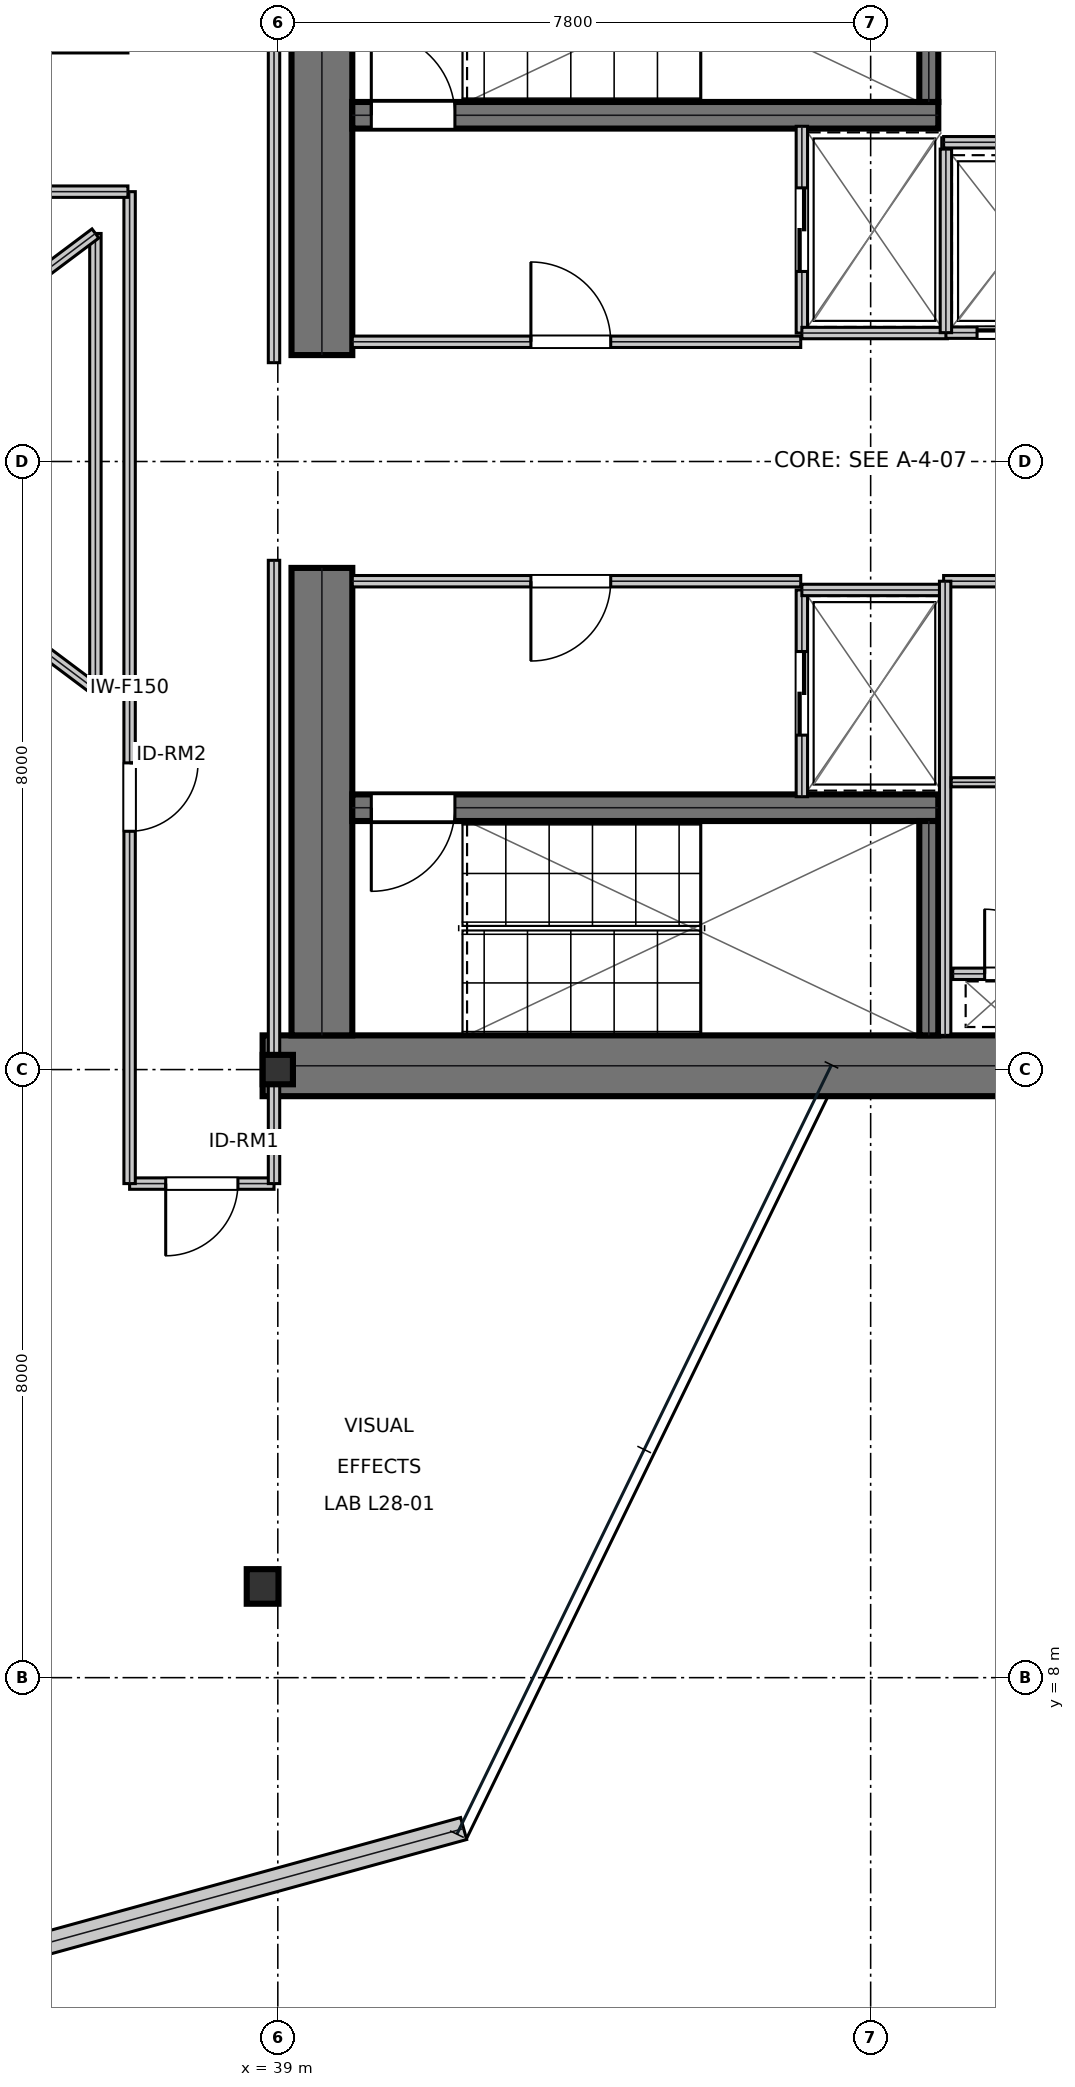
"""IFC4 building model, lengths in metres.
Left out: names, types, materials, properties, quantities, classifications, styles, units other than length and angle.
Written with IfcOpenShell. Run it as: python <this file> out.ifc"""

import sys

from ifc_helpers import new_model, si_unit, direction, frame, frame_2d, origin, origin_2d, place, context, subcontext, project, spatial, rectangle, i_section, extrude, element, fill, save


model = new_model("IFC4")
c1 = context("Model", 3, precision=1e-05, world=origin(), true_north=direction((0.0, 1.0)))
c2 = subcontext(c1, "Body", "Model", "MODEL_VIEW")
j1 = project(units=[si_unit("LENGTHUNIT", "METRE"), si_unit("PLANEANGLEUNIT", "RADIAN")], contexts=[c1])
p1 = place(None, origin())
s1 = spatial("IfcSite", under=j1, at=p1, CompositionType="ELEMENT")
p2 = place(p1, origin())
s2 = spatial("IfcBuilding", under=s1, at=p2, CompositionType="ELEMENT")
p3 = place(p2, frame((0.0, 0.0, 124.95)))
s3 = spatial("IfcBuildingStorey", under=s2, at=p3, CompositionType="ELEMENT", Elevation=124.95)
p4 = place(p3, frame((38.8, 16.05, 0.0), z_axis=(0.0, 0.0, 1.0), x_axis=(1.0, 0.0, 0.0)))
e1 = element("IfcWall", 1, at=p4, inside=s3, PredefinedType="SHEAR", context=c2, shape_type="SweptSolid", body=[
    extrude(rectangle(XDim=16.0, YDim=0.8, at=frame_2d((8.0, 0.0))), origin(), (0.0, 0.0, 1.0), 3.81),
])
for number, where, z_axis, x_axis in (
    (2, (39.58, 16.45, 0.0), (0.0, 0.0, 1.0), (0.0, 1.0, 0.0)),
    (3, (39.58, 25.4, 0.0), (0.0, 0.0, 1.0), (0.0, 1.0, 0.0)),
):
    element("IfcWall", number, at=place(p3, frame(where, z_axis=z_axis, x_axis=x_axis)), inside=s3, PredefinedType="SHEAR", context=c2, shape_type="SweptSolid", body=[
        extrude(rectangle(XDim=6.15, YDim=0.8, at=frame_2d((3.075, 0.0))), origin(), (0.0, 0.0, 1.0), 3.81),
    ])
p5 = place(p3, frame((39.98, 28.555, 0.0), z_axis=(0.0, 0.0, 1.0), x_axis=(1.0, 0.0, 0.0)))
e4 = element("IfcWall", 4, at=p5, inside=s3, PredefinedType="SHEAR", context=c2, shape_type="SweptSolid", body=[
    extrude(rectangle(XDim=7.71, YDim=0.35, at=frame_2d((3.855, 0.0))), origin(), (0.0, 0.0, 1.0), 3.81),
])
p6 = place(p5, frame((0.25, 0.0, 0.0)))
e5 = element("IfcOpeningElement", 5, at=p6, cuts=e4, PredefinedType="OPENING", context=c2, shape_type="SweptSolid", body=[
    extrude(rectangle(XDim=1.1, YDim=2.15, at=frame_2d((0.55, 1.075))), frame((0.0, 0.185, 0.0), z_axis=(0.0, -1.0, 0.0), x_axis=(1.0, 0.0, 0.0)), (0.0, 0.0, 1.0), 0.37),
])
p7 = place(p3, frame((39.98, 19.445, 0.0), z_axis=(0.0, 0.0, 1.0), x_axis=(1.0, 0.0, 0.0)))
e6 = element("IfcWall", 6, at=p7, inside=s3, PredefinedType="SHEAR", context=c2, shape_type="SweptSolid", body=[
    extrude(rectangle(XDim=7.71, YDim=0.35, at=frame_2d((3.855, 0.0))), origin(), (0.0, 0.0, 1.0), 3.81),
])
p8 = place(p7, frame((0.25, 0.0, 0.0)))
e7 = element("IfcOpeningElement", 7, at=p8, cuts=e6, PredefinedType="OPENING", context=c2, shape_type="SweptSolid", body=[
    extrude(rectangle(XDim=1.1, YDim=2.15, at=frame_2d((0.55, 1.075))), frame((0.0, 0.185, 0.0), z_axis=(0.0, -1.0, 0.0), x_axis=(1.0, 0.0, 0.0)), (0.0, 0.0, 1.0), 0.37),
])
for number, where, z_axis, x_axis in (
    (8, (47.565, 28.73, 0.0), (0.0, 0.0, 1.0), (0.0, 1.0, 0.0)),
    (9, (47.565, 16.45, 0.0), (0.0, 0.0, 1.0), (0.0, 1.0, 0.0)),
):
    element("IfcWall", number, at=place(p3, frame(where, z_axis=z_axis, x_axis=x_axis)), inside=s3, PredefinedType="SHEAR", context=c2, shape_type="SweptSolid", body=[
        extrude(rectangle(XDim=2.82, YDim=0.25, at=frame_2d((1.41, 0.0))), origin(), (0.0, 0.0, 1.0), 3.81),
    ])
p9 = place(p3, frame((39.0, 16.0, 0.0), z_axis=(0.0, 0.0, 1.0), x_axis=(1.0, 0.0, 0.0)))
e10 = element("IfcColumn", 10, at=p9, inside=s3, PredefinedType="COLUMN", context=c2, shape_type="SweptSolid", body=[
    extrude(i_section(OverallWidth=0.398, OverallDepth=0.387, WebThickness=0.021, FlangeThickness=0.033, at=origin_2d()), origin(), (0.0, 0.0, 1.0), 4.044),
])
p10 = place(p3, frame((38.8, 9.2, 0.016), z_axis=(-0.006254246892, 0.037343318823, 0.999282923368), x_axis=(-0.986263587143, -0.165179104839, 0.0)))
e11 = element("IfcColumn", 11, at=p10, inside=s3, PredefinedType="COLUMN", context=c2, shape_type="SweptSolid", body=[
    extrude(i_section(OverallWidth=0.418, OverallDepth=0.455, WebThickness=0.042, FlangeThickness=0.068, at=origin_2d()), origin(), (0.0, 0.0, 1.0), 4.021),
])
p11 = place(p3, frame((35.043, 4.255, 0.0), z_axis=(0.0, 0.0, 1.0), x_axis=(0.96422724659, 0.265077001894, 0.0)))
e12 = element("IfcWall", 12, at=p11, inside=s3, PredefinedType="STANDARD", context=c2, shape_type="SweptSolid", body=[
    extrude(rectangle(XDim=6.64, YDim=0.3, at=frame_2d((3.32, 0.0))), origin(), (0.0, 0.0, 1.0), 3.81),
])
p12 = place(p3, frame((39.98, 25.575, 0.0), z_axis=(0.0, 0.0, 1.0), x_axis=(1.0, 0.0, 0.0)))
e13 = element("IfcWall", 13, at=p12, inside=s3, PredefinedType="PARTITIONING", context=c2, shape_type="SweptSolid", body=[
    extrude(rectangle(XDim=5.9, YDim=0.15, at=frame_2d((2.95, 0.0))), origin(), (0.0, 0.0, 1.0), 3.81),
])
p13 = place(p12, frame((2.35, 0.0, 0.0)))
e14 = element("IfcOpeningElement", 14, at=p13, cuts=e13, PredefinedType="OPENING", context=c2, shape_type="SweptSolid", body=[
    extrude(rectangle(XDim=1.05, YDim=2.15, at=frame_2d((0.525, 1.075))), frame((0.0, 0.085, 0.0), z_axis=(0.0, -1.0, 0.0), x_axis=(1.0, 0.0, 0.0)), (0.0, 0.0, 1.0), 0.17),
])
p14 = place(p3, frame((39.98, 22.425, 0.0), z_axis=(0.0, 0.0, 1.0), x_axis=(1.0, 0.0, 0.0)))
e15 = element("IfcWall", 15, at=p14, inside=s3, PredefinedType="PARTITIONING", context=c2, shape_type="SweptSolid", body=[
    extrude(rectangle(XDim=5.9, YDim=0.15, at=frame_2d((2.95, 0.0))), origin(), (0.0, 0.0, 1.0), 3.81),
])
p15 = place(p14, frame((2.35, 0.0, 0.0)))
e16 = element("IfcOpeningElement", 16, at=p15, cuts=e15, PredefinedType="OPENING", context=c2, shape_type="SweptSolid", body=[
    extrude(rectangle(XDim=1.05, YDim=2.15, at=frame_2d((0.525, 1.075))), frame((0.0, 0.085, 0.0), z_axis=(0.0, -1.0, 0.0), x_axis=(1.0, 0.0, 0.0)), (0.0, 0.0, 1.0), 0.17),
])
p16 = place(p3, frame((45.895, 25.69, 0.0), z_axis=(0.0, 0.0, 1.0), x_axis=(0.0, 1.0, 0.0)))
e17 = element("IfcWall", 17, at=p16, inside=s3, PredefinedType="PARTITIONING", context=c2, shape_type="SweptSolid", body=[
    extrude(rectangle(XDim=2.72, YDim=0.15, at=frame_2d((1.36, 0.0))), origin(), (0.0, 0.0, 1.0), 3.81),
])
p17 = place(p16, frame((0.81, 0.0, 0.0)))
e18 = element("IfcOpeningElement", 18, at=p17, cuts=e17, PredefinedType="OPENING", context=c2, shape_type="SweptSolid", body=[
    extrude(rectangle(XDim=1.1, YDim=2.15, at=frame_2d((0.55, 1.075))), frame((0.0, 0.085, 0.0), z_axis=(0.0, -1.0, 0.0), x_axis=(1.0, 0.0, 0.0)), (0.0, 0.0, 1.0), 0.17),
])
p18 = place(p3, frame((45.895, 25.69, 0.0), z_axis=(0.0, 0.0, 1.0), x_axis=(1.0, 0.0, 0.0)))
e19 = element("IfcWall", 19, at=p18, inside=s3, PredefinedType="PARTITIONING", context=c2, shape_type="SweptSolid", body=[
    extrude(rectangle(XDim=1.915, YDim=0.15, at=frame_2d((0.958, 0.0))), origin(), (0.0, 0.0, 1.0), 3.81),
])
p19 = place(p3, frame((45.895, 19.59, 0.0), z_axis=(0.0, 0.0, 1.0), x_axis=(0.0, 1.0, 0.0)))
e20 = element("IfcWall", 20, at=p19, inside=s3, PredefinedType="PARTITIONING", context=c2, shape_type="SweptSolid", body=[
    extrude(rectangle(XDim=2.72, YDim=0.15, at=frame_2d((1.36, 0.0))), origin(), (0.0, 0.0, 1.0), 3.81),
])
p20 = place(p19, frame((0.81, 0.0, 0.0)))
e21 = element("IfcOpeningElement", 21, at=p20, cuts=e20, PredefinedType="OPENING", context=c2, shape_type="SweptSolid", body=[
    extrude(rectangle(XDim=1.1, YDim=2.15, at=frame_2d((0.55, 1.075))), frame((0.0, 0.085, 0.0), z_axis=(0.0, -1.0, 0.0), x_axis=(1.0, 0.0, 0.0)), (0.0, 0.0, 1.0), 0.17),
])
p21 = place(p3, frame((45.895, 22.31, 0.0), z_axis=(0.0, 0.0, 1.0), x_axis=(1.0, 0.0, 0.0)))
e22 = element("IfcWall", 22, at=p21, inside=s3, PredefinedType="PARTITIONING", context=c2, shape_type="SweptSolid", body=[
    extrude(rectangle(XDim=1.915, YDim=0.15, at=frame_2d((0.958, 0.0))), origin(), (0.0, 0.0, 1.0), 3.81),
])
p22 = place(p3, frame((47.79, 25.695, 0.0), z_axis=(0.0, 0.0, 1.0), x_axis=(1.0, 0.0, 0.0)))
e23 = element("IfcWall", 23, at=p22, inside=s3, PredefinedType="PARTITIONING", context=c2, shape_type="SweptSolid", body=[
    extrude(rectangle(XDim=1.92, YDim=0.15, at=frame_2d((0.96, 0.0))), origin(), (0.0, 0.0, 1.0), 3.81),
])
p23 = place(p22, frame((0.41, 0.0, 0.0)))
e24 = element("IfcOpeningElement", 24, at=p23, cuts=e23, PredefinedType="OPENING", context=c2, shape_type="SweptSolid", body=[
    extrude(rectangle(XDim=1.1, YDim=2.15, at=frame_2d((0.55, 1.075))), frame((0.0, 0.085, 0.0), z_axis=(0.0, -1.0, 0.0), x_axis=(1.0, 0.0, 0.0)), (0.0, 0.0, 1.0), 0.17),
])
p24 = place(p3, frame((47.79, 25.695, 0.0), z_axis=(0.0, 0.0, 1.0), x_axis=(0.0, 1.0, 0.0)))
e25 = element("IfcWall", 25, at=p24, inside=s3, PredefinedType="PARTITIONING", context=c2, shape_type="SweptSolid", body=[
    extrude(rectangle(XDim=2.415, YDim=0.15, at=frame_2d((1.208, 0.0))), origin(), (0.0, 0.0, 1.0), 3.81),
])
p25 = place(p3, frame((47.88, 17.26, 0.0), z_axis=(0.0, 0.0, 1.0), x_axis=(1.0, 0.0, 0.0)))
e26 = element("IfcWall", 26, at=p25, inside=s3, PredefinedType="PARTITIONING", context=c2, shape_type="SweptSolid", body=[
    extrude(rectangle(XDim=1.72, YDim=0.15, at=frame_2d((0.86, 0.0))), origin(), (0.0, 0.0, 1.0), 3.81),
])
p26 = place(p25, frame((0.42, 0.0, 0.0)))
e27 = element("IfcOpeningElement", 27, at=p26, cuts=e26, PredefinedType="OPENING", context=c2, shape_type="SweptSolid", body=[
    extrude(rectangle(XDim=0.85, YDim=2.15, at=frame_2d((0.425, 1.075))), frame((0.0, 0.085, 0.0), z_axis=(0.0, -1.0, 0.0), x_axis=(1.0, 0.0, 0.0)), (0.0, 0.0, 1.0), 0.17),
])
p27 = place(p3, frame((47.76, 22.425, 0.0), z_axis=(0.0, 0.0, 1.0), x_axis=(1.0, 0.0, 0.0)))
e28 = element("IfcWall", 28, at=p27, inside=s3, PredefinedType="PARTITIONING", context=c2, shape_type="SweptSolid", body=[
    extrude(rectangle(XDim=1.96, YDim=0.15, at=frame_2d((0.98, 0.0))), origin(), (0.0, 0.0, 1.0), 3.81),
])
p28 = place(p3, frame((47.78, 16.45, 0.0), z_axis=(0.0, 0.0, 1.0), x_axis=(0.0, 1.0, 0.0)))
e29 = element("IfcWall", 29, at=p28, inside=s3, PredefinedType="PARTITIONING", context=c2, shape_type="SweptSolid", body=[
    extrude(rectangle(XDim=5.975, YDim=0.15, at=frame_2d((2.988, 0.0))), origin(), (0.0, 0.0, 1.0), 3.81),
])
p29 = place(p3, frame((47.86, 19.78, 0.0), z_axis=(0.0, 0.0, 1.0), x_axis=(1.0, 0.0, 0.0)))
e30 = element("IfcWall", 30, at=p29, inside=s3, PredefinedType="PARTITIONING", context=c2, shape_type="SweptSolid", body=[
    extrude(rectangle(XDim=1.76, YDim=0.12, at=frame_2d((0.88, 0.0))), origin(), (0.0, 0.0, 1.0), 3.81),
])
p30 = place(p3, frame((47.76, 28.2, 0.0), z_axis=(0.0, 0.0, 1.0), x_axis=(1.0, 0.0, 0.0)))
e31 = element("IfcWall", 31, at=p30, inside=s3, PredefinedType="PARTITIONING", context=c2, shape_type="SweptSolid", body=[
    extrude(rectangle(XDim=1.99, YDim=0.15, at=frame_2d((0.995, 0.0))), origin(), (0.0, 0.0, 1.0), 3.81),
])
p31 = place(p3, frame((37.05, 14.5, 0.0), z_axis=(0.0, 0.0, 1.0), x_axis=(1.0, 0.0, 0.0)))
e32 = element("IfcWall", 32, at=p31, inside=s3, PredefinedType="PARTITIONING", context=c2, shape_type="SweptSolid", body=[
    extrude(rectangle(XDim=1.9, YDim=0.15, at=frame_2d((0.95, 0.0))), origin(), (0.0, 0.0, 1.0), 3.19),
])
p32 = place(p31, frame((0.475, 0.0, 0.0)))
e33 = element("IfcOpeningElement", 33, at=p32, cuts=e32, PredefinedType="OPENING", context=c2, shape_type="SweptSolid", body=[
    extrude(rectangle(XDim=0.95, YDim=2.15, at=frame_2d((0.475, 1.075))), frame((0.0, 0.085, 0.0), z_axis=(0.0, -1.0, 0.0), x_axis=(1.0, 0.0, 0.0)), (0.0, 0.0, 1.0), 0.17),
])
p33 = place(p3, frame((37.05, 14.5, 0.0), z_axis=(0.0, 0.0, 1.0), x_axis=(0.0, 1.0, 0.0)))
e34 = element("IfcWall", 34, at=p33, inside=s3, PredefinedType="PARTITIONING", context=c2, shape_type="SweptSolid", body=[
    extrude(rectangle(XDim=13.05, YDim=0.15, at=frame_2d((6.525, 0.0))), origin(), (0.0, 0.0, 1.0), 3.19),
])
p34 = place(p33, frame((4.635, 0.0, 0.0)))
e35 = element("IfcOpeningElement", 35, at=p34, cuts=e34, PredefinedType="OPENING", context=c2, shape_type="SweptSolid", body=[
    extrude(rectangle(XDim=0.9, YDim=2.15, at=frame_2d((0.45, 1.075))), frame((0.0, 0.085, 0.0), z_axis=(0.0, -1.0, 0.0), x_axis=(1.0, 0.0, 0.0)), (0.0, 0.0, 1.0), 0.17),
])
p35 = place(p3, frame((29.4, 29.45, 0.0), z_axis=(0.0, 0.0, 1.0), x_axis=(1.0, 0.0, 0.0)))
e36 = element("IfcWall", 36, at=p35, inside=s3, PredefinedType="PARTITIONING", context=c2, shape_type="SweptSolid", body=[
    extrude(rectangle(XDim=7.628, YDim=0.15, at=frame_2d((3.814, 0.0))), origin(), (0.0, 0.0, 1.0), 3.19),
])
p36 = place(p35, frame((3.364, 0.0, 0.0)))
e37 = element("IfcOpeningElement", 37, at=p36, cuts=e36, PredefinedType="OPENING", context=c2, shape_type="SweptSolid", body=[
    extrude(rectangle(XDim=0.9, YDim=2.15, at=frame_2d((0.45, 1.075))), frame((0.0, 0.085, 0.0), z_axis=(0.0, -1.0, 0.0), x_axis=(1.0, 0.0, 0.0)), (0.0, 0.0, 1.0), 0.17),
])
p37 = place(p3, frame((38.95, 14.5, 0.0), z_axis=(0.0, 0.0, 1.0), x_axis=(0.0, 1.0, 0.0)))
e38 = element("IfcWall", 38, at=p37, inside=s3, PredefinedType="PARTITIONING", context=c2, shape_type="SweptSolid", body=[
    extrude(rectangle(XDim=8.2, YDim=0.15, at=frame_2d((4.1, 0.0))), origin(), (0.0, 0.0, 1.0), 3.19),
])
p38 = place(p3, frame((29.4, 27.55, 0.0), z_axis=(0.0, 0.0, 1.0), x_axis=(1.0, 0.0, 0.0)))
e39 = element("IfcWall", 39, at=p38, inside=s3, PredefinedType="PARTITIONING", context=c2, shape_type="SweptSolid", body=[
    extrude(rectangle(XDim=7.628, YDim=0.15, at=frame_2d((3.814, 0.0))), origin(), (0.0, 0.0, 1.0), 3.19),
])
p39 = place(p3, frame((38.95, 25.3, 0.0), z_axis=(0.0, 0.0, 1.0), x_axis=(0.0, 1.0, 0.0)))
e40 = element("IfcWall", 40, at=p39, inside=s3, PredefinedType="PARTITIONING", context=c2, shape_type="SweptSolid", body=[
    extrude(rectangle(XDim=8.2, YDim=0.15, at=frame_2d((4.1, 0.0))), origin(), (0.0, 0.0, 1.0), 3.19),
])
p40 = place(p3, frame((32.6, 24.0, 0.0), z_axis=(0.0, 0.0, 1.0), x_axis=(0.8, -0.6, 0.0)))
e41 = element("IfcWall", 41, at=p40, inside=s3, PredefinedType="MOVABLE", context=c2, shape_type="SweptSolid", body=[
    extrude(rectangle(XDim=5.0, YDim=0.15, at=frame_2d((2.5, 0.0))), origin(), (0.0, 0.0, 1.0), 3.81),
])
p41 = place(p3, frame((36.6, 21.0, 0.0), z_axis=(0.0, 0.0, 1.0), x_axis=(0.0, 1.0, 0.0)))
e42 = element("IfcWall", 42, at=p41, inside=s3, PredefinedType="MOVABLE", context=c2, shape_type="SweptSolid", body=[
    extrude(rectangle(XDim=6.0, YDim=0.15, at=frame_2d((3.0, 0.0))), origin(), (0.0, 0.0, 1.0), 3.81),
])
p42 = place(p3, frame((36.6, 27.0, 0.0), z_axis=(0.0, 0.0, 1.0), x_axis=(-0.8, -0.6, 0.0)))
e43 = element("IfcWall", 43, at=p42, inside=s3, PredefinedType="MOVABLE", context=c2, shape_type="SweptSolid", body=[
    extrude(rectangle(XDim=5.0, YDim=0.15, at=frame_2d((2.5, 0.0))), origin(), (0.0, 0.0, 1.0), 3.81),
])
p43 = place(p13, origin())
e44 = element("IfcDoor", 44, at=p43, inside=s3, OperationType="SINGLE_SWING_LEFT", PredefinedType="DOOR", context=c2, shape_type="SweptSolid", body=[
    extrude(rectangle(XDim=1.05, YDim=2.15, at=frame_2d((0.525, 1.075))), frame((0.0, 0.025, 0.0), z_axis=(0.0, -1.0, 0.0), x_axis=(1.0, 0.0, 0.0)), (0.0, 0.0, 1.0), 0.05),
])
fill(e14, e44)
p44 = place(p15, frame((1.05, 0.0, 0.0), z_axis=(0.0, 0.0, 1.0), x_axis=(-1.0, 0.0, 0.0)))
e45 = element("IfcDoor", 45, at=p44, inside=s3, OperationType="SINGLE_SWING_RIGHT", PredefinedType="DOOR", context=c2, shape_type="SweptSolid", body=[
    extrude(rectangle(XDim=1.05, YDim=2.15, at=frame_2d((0.525, 1.075))), frame((0.0, 0.025, 0.0), z_axis=(0.0, -1.0, 0.0), x_axis=(1.0, 0.0, 0.0)), (0.0, 0.0, 1.0), 0.05),
])
fill(e16, e45)
p45 = place(p17, frame((1.1, 0.0, 0.0), z_axis=(0.0, 0.0, 1.0), x_axis=(-1.0, 0.0, 0.0)))
e46 = element("IfcDoor", 46, at=p45, inside=s3, OperationType="DOUBLE_DOOR_SLIDING", PredefinedType="DOOR", context=c2, shape_type="SweptSolid", body=[
    extrude(rectangle(XDim=1.1, YDim=2.15, at=frame_2d((0.55, 1.075))), frame((0.0, 0.025, 0.0), z_axis=(0.0, -1.0, 0.0), x_axis=(1.0, 0.0, 0.0)), (0.0, 0.0, 1.0), 0.05),
])
fill(e18, e46)
p46 = place(p20, frame((1.1, 0.0, 0.0), z_axis=(0.0, 0.0, 1.0), x_axis=(-1.0, 0.0, 0.0)))
e47 = element("IfcDoor", 47, at=p46, inside=s3, OperationType="DOUBLE_DOOR_SLIDING", PredefinedType="DOOR", context=c2, shape_type="SweptSolid", body=[
    extrude(rectangle(XDim=1.1, YDim=2.15, at=frame_2d((0.55, 1.075))), frame((0.0, 0.025, 0.0), z_axis=(0.0, -1.0, 0.0), x_axis=(1.0, 0.0, 0.0)), (0.0, 0.0, 1.0), 0.05),
])
fill(e21, e47)
p47 = place(p23, frame((1.1, 0.0, 0.0), z_axis=(0.0, 0.0, 1.0), x_axis=(-1.0, 0.0, 0.0)))
e48 = element("IfcDoor", 48, at=p47, inside=s3, OperationType="DOUBLE_DOOR_SLIDING", PredefinedType="DOOR", context=c2, shape_type="SweptSolid", body=[
    extrude(rectangle(XDim=1.1, YDim=2.15, at=frame_2d((0.55, 1.075))), frame((0.0, 0.025, 0.0), z_axis=(0.0, -1.0, 0.0), x_axis=(1.0, 0.0, 0.0)), (0.0, 0.0, 1.0), 0.05),
])
fill(e24, e48)
p48 = place(p26, origin())
e49 = element("IfcDoor", 49, at=p48, inside=s3, OperationType="SINGLE_SWING_LEFT", PredefinedType="TRAPDOOR", context=c2, shape_type="SweptSolid", body=[
    extrude(rectangle(XDim=0.85, YDim=2.15, at=frame_2d((0.425, 1.075))), frame((0.0, 0.025, 0.0), z_axis=(0.0, -1.0, 0.0), x_axis=(1.0, 0.0, 0.0)), (0.0, 0.0, 1.0), 0.05),
])
fill(e27, e49)
p49 = place(p32, frame((0.95, 0.0, 0.0), z_axis=(0.0, 0.0, 1.0), x_axis=(-1.0, 0.0, 0.0)))
e50 = element("IfcDoor", 50, at=p49, inside=s3, OperationType="SINGLE_SWING_RIGHT", PredefinedType="DOOR", context=c2, shape_type="SweptSolid", body=[
    extrude(rectangle(XDim=0.95, YDim=2.15, at=frame_2d((0.475, 1.075))), frame((0.0, 0.025, 0.0), z_axis=(0.0, -1.0, 0.0), x_axis=(1.0, 0.0, 0.0)), (0.0, 0.0, 1.0), 0.05),
])
fill(e33, e50)
p50 = place(p34, frame((0.9, 0.0, 0.0), z_axis=(0.0, 0.0, 1.0), x_axis=(-1.0, 0.0, 0.0)))
e51 = element("IfcDoor", 51, at=p50, inside=s3, OperationType="SINGLE_SWING_LEFT", PredefinedType="DOOR", context=c2, shape_type="SweptSolid", body=[
    extrude(rectangle(XDim=0.9, YDim=2.15, at=frame_2d((0.45, 1.075))), frame((0.0, 0.025, 0.0), z_axis=(0.0, -1.0, 0.0), x_axis=(1.0, 0.0, 0.0)), (0.0, 0.0, 1.0), 0.05),
])
fill(e35, e51)
p51 = place(p6, origin())
e52 = element("IfcDoor", 52, at=p51, inside=s3, OperationType="SINGLE_SWING_LEFT", PredefinedType="DOOR", context=c2, shape_type="SweptSolid", body=[
    extrude(rectangle(XDim=1.1, YDim=2.15, at=frame_2d((0.55, 1.075))), frame((0.0, 0.025, 0.0), z_axis=(0.0, -1.0, 0.0), x_axis=(1.0, 0.0, 0.0)), (0.0, 0.0, 1.0), 0.05),
])
fill(e5, e52)
p52 = place(p8, frame((1.1, 0.0, 0.0), z_axis=(0.0, 0.0, 1.0), x_axis=(-1.0, 0.0, 0.0)))
e53 = element("IfcDoor", 53, at=p52, inside=s3, OperationType="SINGLE_SWING_RIGHT", PredefinedType="DOOR", context=c2, shape_type="SweptSolid", body=[
    extrude(rectangle(XDim=1.1, YDim=2.15, at=frame_2d((0.55, 1.075))), frame((0.0, 0.025, 0.0), z_axis=(0.0, -1.0, 0.0), x_axis=(1.0, 0.0, 0.0)), (0.0, 0.0, 1.0), 0.05),
])
fill(e7, e53)
save(model, sys.argv[1])
